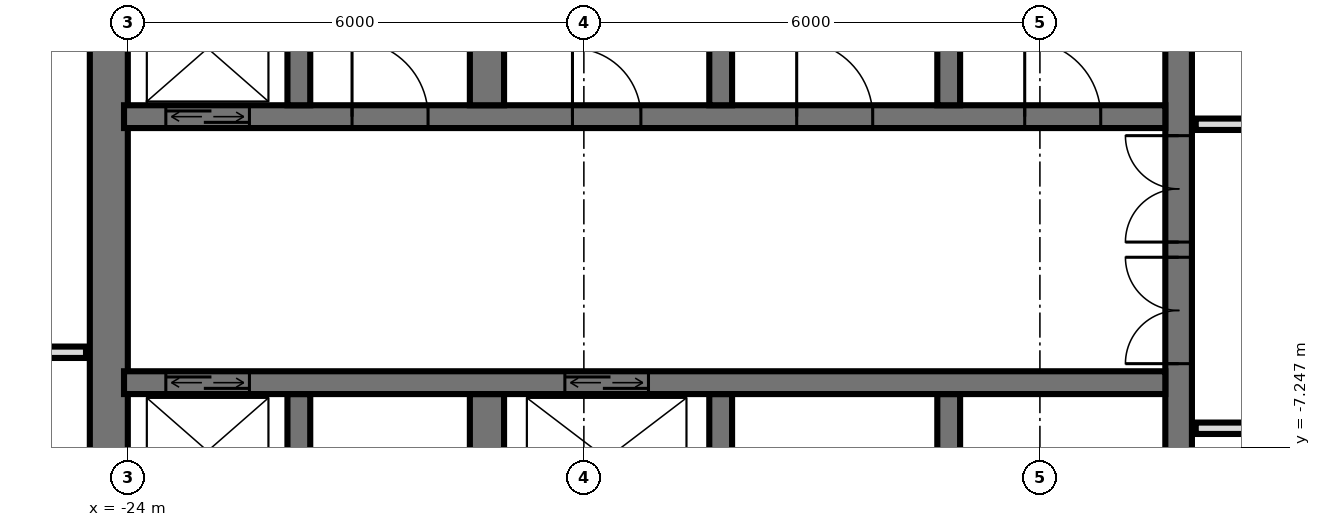
"""IFC4 building model, lengths in metres.
Left out: names, types, materials, properties, quantities, classifications, styles, units other than length and angle.
Written with IfcOpenShell. Run it as: python <this file> out.ifc"""

import sys

from ifc_helpers import new_model, si_unit, direction, frame, frame_2d, origin, place, context, subcontext, project, spatial, rectangle, extrude, element, fill, save


model = new_model("IFC4")
c1 = context("Model", 3, precision=1e-05, world=origin(), true_north=direction((0.0, 1.0)))
c2 = subcontext(c1, "Body", "Model", "MODEL_VIEW")
j1 = project(units=[si_unit("LENGTHUNIT", "METRE"), si_unit("PLANEANGLEUNIT", "RADIAN")], contexts=[c1])
p1 = place(None, origin())
s1 = spatial("IfcSite", under=j1, at=p1, CompositionType="ELEMENT")
p2 = place(p1, origin())
s2 = spatial("IfcBuilding", under=s1, at=p2, CompositionType="ELEMENT")
p3 = place(p2, frame((0.0, 0.0, 141.6)))
s3 = spatial("IfcBuildingStorey", under=s2, at=p3, CompositionType="ELEMENT", Elevation=141.6)
p4 = place(p3, frame((-10.175, -14.55, 0.0), z_axis=(0.0, 0.0, 1.0), x_axis=(0.0, 1.0, 0.0)))
e1 = element("IfcWall", 1, at=p4, inside=s3, PredefinedType="SHEAR", context=c2, shape_type="SweptSolid", body=[
    extrude(rectangle(XDim=14.1, YDim=0.35, at=frame_2d((7.05, 0.0))), origin(), (0.0, 0.0, 1.0), 3.6),
])
p5 = place(p4, frame((8.4, 0.0, 0.0)))
e2 = element("IfcOpeningElement", 2, at=p5, cuts=e1, PredefinedType="OPENING", context=c2, shape_type="SweptSolid", body=[
    extrude(rectangle(XDim=1.4, YDim=2.4, at=frame_2d((0.7, 1.2))), frame((0.0, 0.185, 0.0), z_axis=(0.0, -1.0, 0.0), x_axis=(1.0, 0.0, 0.0)), (0.0, 0.0, 1.0), 0.37),
])
p6 = place(p4, frame((10.0, 0.0, 0.0)))
e3 = element("IfcOpeningElement", 3, at=p6, cuts=e1, PredefinedType="OPENING", context=c2, shape_type="SweptSolid", body=[
    extrude(rectangle(XDim=1.4, YDim=2.4, at=frame_2d((0.7, 1.2))), frame((0.0, 0.185, 0.0), z_axis=(0.0, -1.0, 0.0), x_axis=(1.0, 0.0, 0.0)), (0.0, 0.0, 1.0), 0.37),
])
p7 = place(p4, frame((4.0, 0.0, 0.0)))
e4 = element("IfcOpeningElement", 4, at=p7, cuts=e1, PredefinedType="OPENING", context=c2, shape_type="SweptSolid", body=[
    extrude(rectangle(XDim=1.2, YDim=2.1, at=frame_2d((0.6, 1.05))), frame((0.0, 0.185, 0.0), z_axis=(0.0, -1.0, 0.0), x_axis=(1.0, 0.0, 0.0)), (0.0, 0.0, 1.0), 0.37),
])
p8 = place(p3, frame((-24.25, -14.55, 0.0), z_axis=(0.0, 0.0, 1.0), x_axis=(0.0, 1.0, 0.0)))
e5 = element("IfcWall", 5, at=p8, inside=s3, PredefinedType="SHEAR", context=c2, shape_type="SweptSolid", body=[
    extrude(rectangle(XDim=14.1, YDim=0.5, at=frame_2d((7.05, 0.0))), origin(), (0.0, 0.0, 1.0), 3.6),
])
p9 = place(p3, frame((-24.05, -2.9, 0.0), z_axis=(0.0, 0.0, 1.0), x_axis=(1.0, 0.0, 0.0)))
e6 = element("IfcWall", 6, at=p9, inside=s3, PredefinedType="SHEAR", context=c2, shape_type="SweptSolid", body=[
    extrude(rectangle(XDim=13.7, YDim=0.3, at=frame_2d((6.85, 0.0))), origin(), (0.0, 0.0, 1.0), 3.6),
])
p10 = place(p9, frame((0.55, 0.0, 0.0)))
e7 = element("IfcOpeningElement", 7, at=p10, cuts=e6, PredefinedType="OPENING", context=c2, shape_type="SweptSolid", body=[
    extrude(rectangle(XDim=1.1, YDim=2.1, at=frame_2d((0.55, 1.05))), frame((0.0, 0.16, 0.0), z_axis=(0.0, -1.0, 0.0), x_axis=(1.0, 0.0, 0.0)), (0.0, 0.0, 1.0), 0.32),
])
p11 = place(p9, frame((5.9, 0.0, 0.0)))
e8 = element("IfcOpeningElement", 8, at=p11, cuts=e6, PredefinedType="OPENING", context=c2, shape_type="SweptSolid", body=[
    extrude(rectangle(XDim=0.9, YDim=2.1, at=frame_2d((0.45, 1.05))), frame((0.0, 0.16, 0.0), z_axis=(0.0, -1.0, 0.0), x_axis=(1.0, 0.0, 0.0)), (0.0, 0.0, 1.0), 0.32),
])
p12 = place(p9, frame((11.85, 0.0, 0.0)))
e9 = element("IfcOpeningElement", 9, at=p12, cuts=e6, PredefinedType="OPENING", context=c2, shape_type="SweptSolid", body=[
    extrude(rectangle(XDim=1.0, YDim=2.1, at=frame_2d((0.5, 1.05))), frame((0.0, 0.16, 0.0), z_axis=(0.0, -1.0, 0.0), x_axis=(1.0, 0.0, 0.0)), (0.0, 0.0, 1.0), 0.32),
])
p13 = place(p9, frame((8.85, 0.0, 0.0)))
e10 = element("IfcOpeningElement", 10, at=p13, cuts=e6, PredefinedType="OPENING", context=c2, shape_type="SweptSolid", body=[
    extrude(rectangle(XDim=1.0, YDim=2.1, at=frame_2d((0.5, 1.05))), frame((0.0, 0.16, 0.0), z_axis=(0.0, -1.0, 0.0), x_axis=(1.0, 0.0, 0.0)), (0.0, 0.0, 1.0), 0.32),
])
p14 = place(p9, frame((3.0, 0.0, 0.0)))
e11 = element("IfcOpeningElement", 11, at=p14, cuts=e6, PredefinedType="OPENING", context=c2, shape_type="SweptSolid", body=[
    extrude(rectangle(XDim=1.0, YDim=2.1, at=frame_2d((0.5, 1.05))), frame((0.0, 0.16, 0.0), z_axis=(0.0, -1.0, 0.0), x_axis=(1.0, 0.0, 0.0)), (0.0, 0.0, 1.0), 0.32),
])
p15 = place(p3, frame((-24.05, -6.4, 0.0), z_axis=(0.0, 0.0, 1.0), x_axis=(1.0, 0.0, 0.0)))
e12 = element("IfcWall", 12, at=p15, inside=s3, PredefinedType="SHEAR", context=c2, shape_type="SweptSolid", body=[
    extrude(rectangle(XDim=13.7, YDim=0.3, at=frame_2d((6.85, 0.0))), origin(), (0.0, 0.0, 1.0), 3.6),
])
p16 = place(p15, frame((0.55, 0.0, 0.0)))
e13 = element("IfcOpeningElement", 13, at=p16, cuts=e12, PredefinedType="OPENING", context=c2, shape_type="SweptSolid", body=[
    extrude(rectangle(XDim=1.1, YDim=2.1, at=frame_2d((0.55, 1.05))), frame((0.0, 0.16, 0.0), z_axis=(0.0, -1.0, 0.0), x_axis=(1.0, 0.0, 0.0)), (0.0, 0.0, 1.0), 0.32),
])
p17 = place(p15, frame((5.8, 0.0, 0.0)))
e14 = element("IfcOpeningElement", 14, at=p17, cuts=e12, PredefinedType="OPENING", context=c2, shape_type="SweptSolid", body=[
    extrude(rectangle(XDim=1.1, YDim=2.1, at=frame_2d((0.55, 1.05))), frame((0.0, 0.16, 0.0), z_axis=(0.0, -1.0, 0.0), x_axis=(1.0, 0.0, 0.0)), (0.0, 0.0, 1.0), 0.32),
])
for number, where, z_axis, x_axis in (
    (15, (-13.2, -2.75, 0.0), (0.0, 0.0, 1.0), (0.0, 1.0, 0.0)),
    (16, (-13.2, -8.85, 0.0), (0.0, 0.0, 1.0), (0.0, 1.0, 0.0)),
    (17, (-16.2, -2.75, 0.0), (0.0, 0.0, 1.0), (0.0, 1.0, 0.0)),
    (18, (-16.2, -8.85, 0.0), (0.0, 0.0, 1.0), (0.0, 1.0, 0.0)),
):
    element("IfcWall", number, at=place(p3, frame(where, z_axis=z_axis, x_axis=x_axis)), inside=s3, PredefinedType="SHEAR", context=c2, shape_type="SweptSolid", body=[
        extrude(rectangle(XDim=2.3, YDim=0.3, at=frame_2d((1.15, 0.0))), origin(), (0.0, 0.0, 1.0), 3.6),
    ])
for number, where, z_axis, x_axis in (
    (19, (-19.275, -2.75, 0.0), (0.0, 0.0, 1.0), (0.0, 1.0, 0.0)),
    (20, (-19.275, -8.85, 0.0), (0.0, 0.0, 1.0), (0.0, 1.0, 0.0)),
):
    element("IfcWall", number, at=place(p3, frame(where, z_axis=z_axis, x_axis=x_axis)), inside=s3, PredefinedType="SHEAR", context=c2, shape_type="SweptSolid", body=[
        extrude(rectangle(XDim=2.3, YDim=0.45, at=frame_2d((1.15, 0.0))), origin(), (0.0, 0.0, 1.0), 3.6),
    ])
for number, where, z_axis, x_axis in (
    (21, (-21.75, -2.75, 0.0), (0.0, 0.0, 1.0), (0.0, 1.0, 0.0)),
    (22, (-21.75, -8.85, 0.0), (0.0, 0.0, 1.0), (0.0, 1.0, 0.0)),
):
    element("IfcWall", number, at=place(p3, frame(where, z_axis=z_axis, x_axis=x_axis)), inside=s3, PredefinedType="SHEAR", context=c2, shape_type="SweptSolid", body=[
        extrude(rectangle(XDim=2.3, YDim=0.3, at=frame_2d((1.15, 0.0))), origin(), (0.0, 0.0, 1.0), 3.6),
    ])
p18 = place(p3, frame((-9.95, -7.0, 0.0), z_axis=(0.0, 0.0, 1.0), x_axis=(1.0, 0.0, 0.0)))
e23 = element("IfcWall", 23, at=p18, inside=s3, PredefinedType="PARTITIONING", context=c2, shape_type="SweptSolid", body=[
    extrude(rectangle(XDim=19.9, YDim=0.15, at=frame_2d((9.95, 0.0))), origin(), (0.0, 0.0, 1.0), 3.32),
])
p19 = place(p18, frame((9.45, 0.0, 0.0)))
e24 = element("IfcOpeningElement", 24, at=p19, cuts=e23, PredefinedType="OPENING", context=c2, shape_type="SweptSolid", body=[
    extrude(rectangle(XDim=1.0, YDim=2.1, at=frame_2d((0.5, 1.05))), frame((0.0, 0.085, 0.0), z_axis=(0.0, -1.0, 0.0), x_axis=(1.0, 0.0, 0.0)), (0.0, 0.0, 1.0), 0.17),
])
p20 = place(p18, frame((3.45, 0.0, 0.0)))
e25 = element("IfcOpeningElement", 25, at=p20, cuts=e23, PredefinedType="OPENING", context=c2, shape_type="SweptSolid", body=[
    extrude(rectangle(XDim=1.0, YDim=2.1, at=frame_2d((0.5, 1.05))), frame((0.0, 0.085, 0.0), z_axis=(0.0, -1.0, 0.0), x_axis=(1.0, 0.0, 0.0)), (0.0, 0.0, 1.0), 0.17),
])
p21 = place(p3, frame((-28.02, -6.0, 0.0), z_axis=(0.0, 0.0, 1.0), x_axis=(1.0, 0.0, 0.0)))
e26 = element("IfcWall", 26, at=p21, inside=s3, PredefinedType="PLUMBINGWALL", context=c2, shape_type="SweptSolid", body=[
    extrude(rectangle(XDim=3.47, YDim=0.15, at=frame_2d((1.735, 0.0))), origin(), (0.0, 0.0, 1.0), 3.32),
])
p22 = place(p21, frame((1.22, 0.0, 0.0)))
e27 = element("IfcOpeningElement", 27, at=p22, cuts=e26, PredefinedType="OPENING", context=c2, shape_type="SweptSolid", body=[
    extrude(rectangle(XDim=0.9, YDim=2.1, at=frame_2d((0.45, 1.05))), frame((0.0, 0.085, 0.0), z_axis=(0.0, -1.0, 0.0), x_axis=(1.0, 0.0, 0.0)), (0.0, 0.0, 1.0), 0.17),
])
p23 = place(p3, frame((-9.95, -3.0, 0.0), z_axis=(0.0, 0.0, 1.0), x_axis=(1.0, 0.0, 0.0)))
e28 = element("IfcWall", 28, at=p23, inside=s3, PredefinedType="PARTITIONING", context=c2, shape_type="SweptSolid", body=[
    extrude(rectangle(XDim=19.9, YDim=0.15, at=frame_2d((9.95, 0.0))), origin(), (0.0, 0.0, 1.0), 3.32),
])
p24 = place(p23, frame((4.2, 0.0, 0.0)))
e29 = element("IfcOpeningElement", 29, at=p24, cuts=e28, PredefinedType="OPENING", context=c2, shape_type="SweptSolid", body=[
    extrude(rectangle(XDim=1.0, YDim=2.1, at=frame_2d((0.5, 1.05))), frame((0.0, 0.085, 0.0), z_axis=(0.0, -1.0, 0.0), x_axis=(1.0, 0.0, 0.0)), (0.0, 0.0, 1.0), 0.17),
])
p25 = place(p23, frame((11.45, 0.0, 0.0)))
e30 = element("IfcOpeningElement", 30, at=p25, cuts=e28, PredefinedType="OPENING", context=c2, shape_type="SweptSolid", body=[
    extrude(rectangle(XDim=1.0, YDim=2.1, at=frame_2d((0.5, 1.05))), frame((0.0, 0.085, 0.0), z_axis=(0.0, -1.0, 0.0), x_axis=(1.0, 0.0, 0.0)), (0.0, 0.0, 1.0), 0.17),
])
p26 = place(p23, frame((15.45, 0.0, 0.0)))
e31 = element("IfcOpeningElement", 31, at=p26, cuts=e28, PredefinedType="OPENING", context=c2, shape_type="SweptSolid", body=[
    extrude(rectangle(XDim=1.0, YDim=2.1, at=frame_2d((0.5, 1.05))), frame((0.0, 0.085, 0.0), z_axis=(0.0, -1.0, 0.0), x_axis=(1.0, 0.0, 0.0)), (0.0, 0.0, 1.0), 0.17),
])
p27 = place(p23, frame((18.2, 0.0, 0.0)))
e32 = element("IfcOpeningElement", 32, at=p27, cuts=e28, PredefinedType="OPENING", context=c2, shape_type="SweptSolid", body=[
    extrude(rectangle(XDim=1.0, YDim=2.1, at=frame_2d((0.5, 1.05))), frame((0.0, 0.085, 0.0), z_axis=(0.0, -1.0, 0.0), x_axis=(1.0, 0.0, 0.0)), (0.0, 0.0, 1.0), 0.17),
])
p28 = place(p10, origin())
e33 = element("IfcDoor", 33, at=p28, inside=s3, OperationType="DOUBLE_DOOR_SLIDING", PredefinedType="USERDEFINED", context=c2, shape_type="SweptSolid", body=[
    extrude(rectangle(XDim=1.1, YDim=2.1, at=frame_2d((0.55, 1.05))), frame((0.0, 0.025, 0.0), z_axis=(0.0, -1.0, 0.0), x_axis=(1.0, 0.0, 0.0)), (0.0, 0.0, 1.0), 0.05),
])
fill(e7, e33)
p29 = place(p16, origin())
e34 = element("IfcDoor", 34, at=p29, inside=s3, OperationType="DOUBLE_DOOR_SLIDING", PredefinedType="USERDEFINED", context=c2, shape_type="SweptSolid", body=[
    extrude(rectangle(XDim=1.1, YDim=2.1, at=frame_2d((0.55, 1.05))), frame((0.0, 0.025, 0.0), z_axis=(0.0, -1.0, 0.0), x_axis=(1.0, 0.0, 0.0)), (0.0, 0.0, 1.0), 0.05),
])
fill(e13, e34)
p30 = place(p17, origin())
e35 = element("IfcDoor", 35, at=p30, inside=s3, OperationType="DOUBLE_DOOR_SLIDING", PredefinedType="USERDEFINED", context=c2, shape_type="SweptSolid", body=[
    extrude(rectangle(XDim=1.1, YDim=2.1, at=frame_2d((0.55, 1.05))), frame((0.0, 0.025, 0.0), z_axis=(0.0, -1.0, 0.0), x_axis=(1.0, 0.0, 0.0)), (0.0, 0.0, 1.0), 0.05),
])
fill(e14, e35)
p31 = place(p5, origin())
e36 = element("IfcDoor", 36, at=p31, inside=s3, OperationType="DOUBLE_DOOR_SINGLE_SWING", PredefinedType="DOOR", context=c2, shape_type="SweptSolid", body=[
    extrude(rectangle(XDim=1.4, YDim=2.4, at=frame_2d((0.7, 1.2))), frame((0.0, 0.025, 0.0), z_axis=(0.0, -1.0, 0.0), x_axis=(1.0, 0.0, 0.0)), (0.0, 0.0, 1.0), 0.05),
])
fill(e2, e36)
p32 = place(p6, origin())
e37 = element("IfcDoor", 37, at=p32, inside=s3, OperationType="DOUBLE_DOOR_SINGLE_SWING", PredefinedType="DOOR", context=c2, shape_type="SweptSolid", body=[
    extrude(rectangle(XDim=1.4, YDim=2.4, at=frame_2d((0.7, 1.2))), frame((0.0, 0.025, 0.0), z_axis=(0.0, -1.0, 0.0), x_axis=(1.0, 0.0, 0.0)), (0.0, 0.0, 1.0), 0.05),
])
fill(e3, e37)
p33 = place(p11, origin())
e38 = element("IfcDoor", 38, at=p33, inside=s3, OperationType="SINGLE_SWING_RIGHT", PredefinedType="DOOR", context=c2, shape_type="SweptSolid", body=[
    extrude(rectangle(XDim=0.9, YDim=2.1, at=frame_2d((0.45, 1.05))), frame((0.0, 0.025, 0.0), z_axis=(0.0, -1.0, 0.0), x_axis=(1.0, 0.0, 0.0)), (0.0, 0.0, 1.0), 0.05),
])
fill(e8, e38)
p34 = place(p12, origin())
e39 = element("IfcDoor", 39, at=p34, inside=s3, OperationType="SINGLE_SWING_RIGHT", PredefinedType="DOOR", context=c2, shape_type="SweptSolid", body=[
    extrude(rectangle(XDim=1.0, YDim=2.1, at=frame_2d((0.5, 1.05))), frame((0.0, 0.025, 0.0), z_axis=(0.0, -1.0, 0.0), x_axis=(1.0, 0.0, 0.0)), (0.0, 0.0, 1.0), 0.05),
])
fill(e9, e39)
p35 = place(p13, origin())
e40 = element("IfcDoor", 40, at=p35, inside=s3, OperationType="SINGLE_SWING_RIGHT", PredefinedType="DOOR", context=c2, shape_type="SweptSolid", body=[
    extrude(rectangle(XDim=1.0, YDim=2.1, at=frame_2d((0.5, 1.05))), frame((0.0, 0.025, 0.0), z_axis=(0.0, -1.0, 0.0), x_axis=(1.0, 0.0, 0.0)), (0.0, 0.0, 1.0), 0.05),
])
fill(e10, e40)
p36 = place(p14, origin())
e41 = element("IfcDoor", 41, at=p36, inside=s3, OperationType="SINGLE_SWING_RIGHT", PredefinedType="DOOR", context=c2, shape_type="SweptSolid", body=[
    extrude(rectangle(XDim=1.0, YDim=2.1, at=frame_2d((0.5, 1.05))), frame((0.0, 0.025, 0.0), z_axis=(0.0, -1.0, 0.0), x_axis=(1.0, 0.0, 0.0)), (0.0, 0.0, 1.0), 0.05),
])
fill(e11, e41)
save(model, sys.argv[1])
